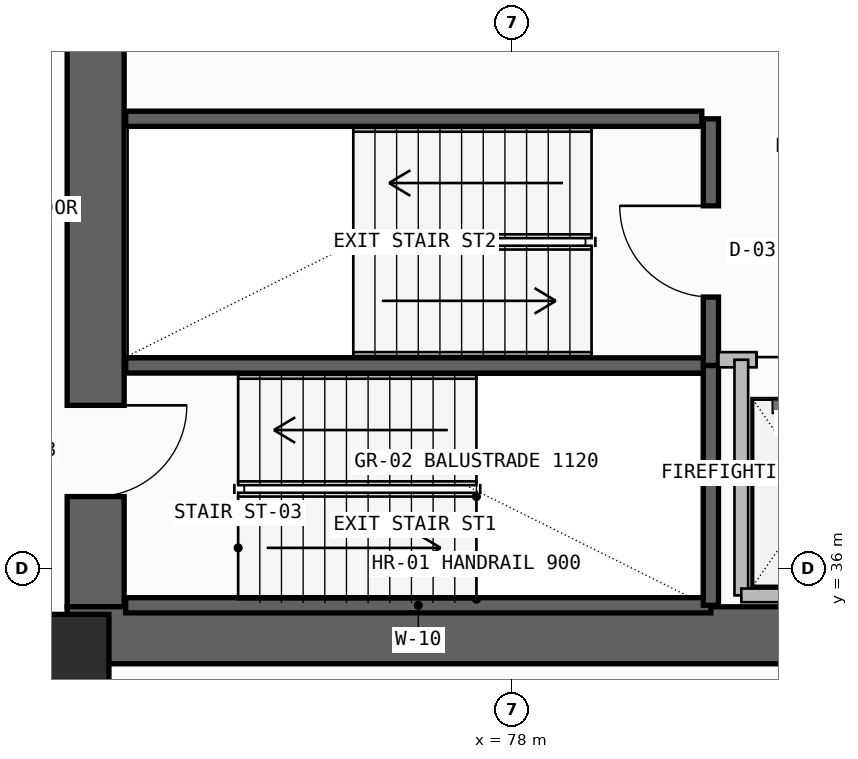
"""IFC4 building model, lengths in metres.
Left out: names, types, materials, properties, quantities, classifications, styles, units other than length and angle.
Written with IfcOpenShell. Run it as: python <this file> out.ifc"""

import sys

from ifc_helpers import new_model, si_unit, direction, frame, frame_2d, origin, origin_2d, place, context, subcontext, project, spatial, rectangle, extrude, element, fill, save


model = new_model("IFC4")
c1 = context("Model", 3, precision=1e-05, world=origin(), true_north=direction((0.0, 1.0)))
c2 = subcontext(c1, "Body", "Model", "MODEL_VIEW")
j1 = project(units=[si_unit("LENGTHUNIT", "METRE"), si_unit("PLANEANGLEUNIT", "RADIAN")], contexts=[c1])
p1 = place(None, origin())
s1 = spatial("IfcSite", under=j1, at=p1, CompositionType="ELEMENT")
p2 = place(p1, origin())
s2 = spatial("IfcBuilding", under=s1, at=p2, CompositionType="ELEMENT")
p3 = place(p2, frame((0.0, 0.0, 196.7)))
s3 = spatial("IfcBuildingStorey", under=s2, at=p3, CompositionType="ELEMENT", Elevation=196.7)
p4 = place(p3, frame((72.525, 35.5, -0.5), z_axis=(0.0, 0.0, 1.0), x_axis=(0.0, 1.0, 0.0)))
e1 = element("IfcWall", 1, at=p4, inside=s3, PredefinedType="SHEAR", context=c2, shape_type="SweptSolid", body=[
    extrude(rectangle(XDim=7.85, YDim=0.75, at=frame_2d((3.925, 0.0))), origin(), (0.0, 0.0, 1.0), 4.3),
])
p5 = place(p4, frame((1.45, 0.0, 0.5)))
e2 = element("IfcOpeningElement", 2, at=p5, cuts=e1, PredefinedType="OPENING", context=c2, shape_type="SweptSolid", body=[
    extrude(rectangle(XDim=1.2, YDim=2.2, at=frame_2d((0.6, 1.1))), frame((0.0, 0.385, 0.0), z_axis=(0.0, -1.0, 0.0), x_axis=(1.0, 0.0, 0.0)), (0.0, 0.0, 1.0), 0.77),
])
p6 = place(p3, frame((72.15, 35.125, -0.5), z_axis=(0.0, 0.0, 1.0), x_axis=(1.0, 0.0, 0.0)))
e3 = element("IfcWall", 3, at=p6, inside=s3, PredefinedType="SHEAR", context=c2, shape_type="SweptSolid", body=[
    extrude(rectangle(XDim=13.6, YDim=0.75, at=frame_2d((6.8, 0.0))), origin(), (0.0, 0.0, 1.0), 4.3),
])
p7 = place(p3, frame((72.0, 34.7, 0.0), z_axis=(0.0, 0.0, 1.0), x_axis=(1.0, 0.0, 0.0)))
e4 = element("IfcColumn", 4, at=p7, inside=s3, PredefinedType="COLUMN", context=c2, shape_type="SweptSolid", body=[
    extrude(rectangle(XDim=1.4, YDim=1.4, at=origin_2d()), origin(), (0.0, 0.0, 1.0), 4.2),
])
for number, where, z_axis, x_axis in (
    (5, (72.92, 35.52, -0.5), (0.0, 0.0, 1.0), (1.0, 0.0, 0.0)),
    (6, (72.92, 38.675, -0.5), (0.0, 0.0, 1.0), (1.0, 0.0, 0.0)),
):
    element("IfcWall", number, at=place(p3, frame(where, z_axis=z_axis, x_axis=x_axis)), inside=s3, PredefinedType="SOLIDWALL", context=c2, shape_type="SweptSolid", body=[
        extrude(rectangle(XDim=7.7, YDim=0.2, at=frame_2d((3.85, 0.0))), origin(), (0.0, 0.0, 1.0), 4.3),
    ])
p8 = place(p3, frame((80.62, 35.52, -0.5), z_axis=(0.0, 0.0, 1.0), x_axis=(0.0, 1.0, 0.0)))
e7 = element("IfcWall", 7, at=p8, inside=s3, PredefinedType="SOLIDWALL", context=c2, shape_type="SweptSolid", body=[
    extrude(rectangle(XDim=3.155, YDim=0.2, at=frame_2d((1.578, 0.0))), origin(), (0.0, 0.0, 1.0), 4.3),
])
p9 = place(p3, frame((80.62, 38.675, -0.5), z_axis=(0.0, 0.0, 1.0), x_axis=(0.0, 1.0, 0.0)))
e8 = element("IfcWall", 8, at=p9, inside=s3, PredefinedType="SOLIDWALL", context=c2, shape_type="SweptSolid", body=[
    extrude(rectangle(XDim=3.245, YDim=0.2, at=frame_2d((1.623, 0.0))), origin(), (0.0, 0.0, 1.0), 4.3),
])
p10 = place(p9, frame((0.9, 0.0, 0.5)))
e9 = element("IfcOpeningElement", 9, at=p10, cuts=e8, PredefinedType="OPENING", context=c2, shape_type="SweptSolid", body=[
    extrude(rectangle(XDim=1.2, YDim=2.2, at=frame_2d((0.6, 1.1))), frame((0.0, 0.11, 0.0), z_axis=(0.0, -1.0, 0.0), x_axis=(1.0, 0.0, 0.0)), (0.0, 0.0, 1.0), 0.22),
])
p11 = place(p3, frame((80.72, 38.75, 0.0), z_axis=(0.0, 0.0, 1.0), x_axis=(1.0, 0.0, 0.0)))
e10 = element("IfcWall", 10, at=p11, inside=s3, PredefinedType="SOLIDWALL", context=c2, shape_type="SweptSolid", body=[
    extrude(rectangle(XDim=4.26, YDim=0.2, at=frame_2d((2.13, 0.0))), origin(), (0.0, 0.0, 1.0), 3.8),
])
p12 = place(p11, frame((0.5, 0.0, 0.0)))
e11 = element("IfcOpeningElement", 11, at=p12, cuts=e10, PredefinedType="OPENING", context=c2, shape_type="SweptSolid", body=[
    extrude(rectangle(XDim=1.3, YDim=2.3, at=frame_2d((0.65, 1.15))), frame((0.0, 0.11, 0.0), z_axis=(0.0, -1.0, 0.0), x_axis=(1.0, 0.0, 0.0)), (0.0, 0.0, 1.0), 0.22),
])
p13 = place(p11, frame((2.45, 0.0, 0.0)))
e12 = element("IfcOpeningElement", 12, at=p13, cuts=e10, PredefinedType="OPENING", context=c2, shape_type="SweptSolid", body=[
    extrude(rectangle(XDim=1.3, YDim=2.3, at=frame_2d((0.65, 1.15))), frame((0.0, 0.11, 0.0), z_axis=(0.0, -1.0, 0.0), x_axis=(1.0, 0.0, 0.0)), (0.0, 0.0, 1.0), 0.22),
])
p14 = place(p3, frame((81.02, 35.65, 0.0), z_axis=(0.0, 0.0, 1.0), x_axis=(0.0, 1.0, 0.0)))
e13 = element("IfcWall", 13, at=p14, inside=s3, PredefinedType="SOLIDWALL", context=c2, shape_type="SweptSolid", body=[
    extrude(rectangle(XDim=3.1, YDim=0.18, at=frame_2d((1.55, 0.0))), origin(), (0.0, 0.0, 1.0), 3.8),
])
p15 = place(p3, frame((81.02, 35.65, 0.0), z_axis=(0.0, 0.0, 1.0), x_axis=(1.0, 0.0, 0.0)))
e14 = element("IfcWall", 14, at=p15, inside=s3, PredefinedType="SOLIDWALL", context=c2, shape_type="SweptSolid", body=[
    extrude(rectangle(XDim=3.93, YDim=0.18, at=frame_2d((1.965, 0.0))), origin(), (0.0, 0.0, 1.0), 3.8),
])
p16 = place(p3, frame((72.92, 41.92, -0.5), z_axis=(0.0, 0.0, 1.0), x_axis=(1.0, 0.0, 0.0)))
e15 = element("IfcWall", 15, at=p16, inside=s3, PredefinedType="SOLIDWALL", context=c2, shape_type="SweptSolid", body=[
    extrude(rectangle(XDim=7.58, YDim=0.2, at=frame_2d((3.79, 0.0))), origin(), (0.0, 0.0, 1.0), 4.3),
])
p17 = place(p5, frame((1.2, 0.0, 0.0), z_axis=(0.0, 0.0, 1.0), x_axis=(-1.0, 0.0, 0.0)))
e16 = element("IfcDoor", 16, at=p17, inside=s3, OperationType="SINGLE_SWING_LEFT", PredefinedType="USERDEFINED", context=c2, shape_type="SweptSolid", body=[
    extrude(rectangle(XDim=1.2, YDim=2.2, at=frame_2d((0.6, 1.1))), frame((0.0, 0.025, 0.0), z_axis=(0.0, -1.0, 0.0), x_axis=(1.0, 0.0, 0.0)), (0.0, 0.0, 1.0), 0.05),
])
fill(e2, e16)
p18 = place(p10, origin())
e17 = element("IfcDoor", 17, at=p18, inside=s3, OperationType="SINGLE_SWING_RIGHT", PredefinedType="USERDEFINED", context=c2, shape_type="SweptSolid", body=[
    extrude(rectangle(XDim=1.2, YDim=2.2, at=frame_2d((0.6, 1.1))), frame((0.0, 0.025, 0.0), z_axis=(0.0, -1.0, 0.0), x_axis=(1.0, 0.0, 0.0)), (0.0, 0.0, 1.0), 0.05),
])
fill(e9, e17)
p19 = place(p12, origin())
e18 = element("IfcDoor", 18, at=p19, inside=s3, OperationType="DOUBLE_DOOR_SLIDING", PredefinedType="DOOR", context=c2, shape_type="SweptSolid", body=[
    extrude(rectangle(XDim=1.3, YDim=2.3, at=frame_2d((0.65, 1.15))), frame((0.0, 0.025, 0.0), z_axis=(0.0, -1.0, 0.0), x_axis=(1.0, 0.0, 0.0)), (0.0, 0.0, 1.0), 0.05),
])
fill(e11, e18)
save(model, sys.argv[1])
